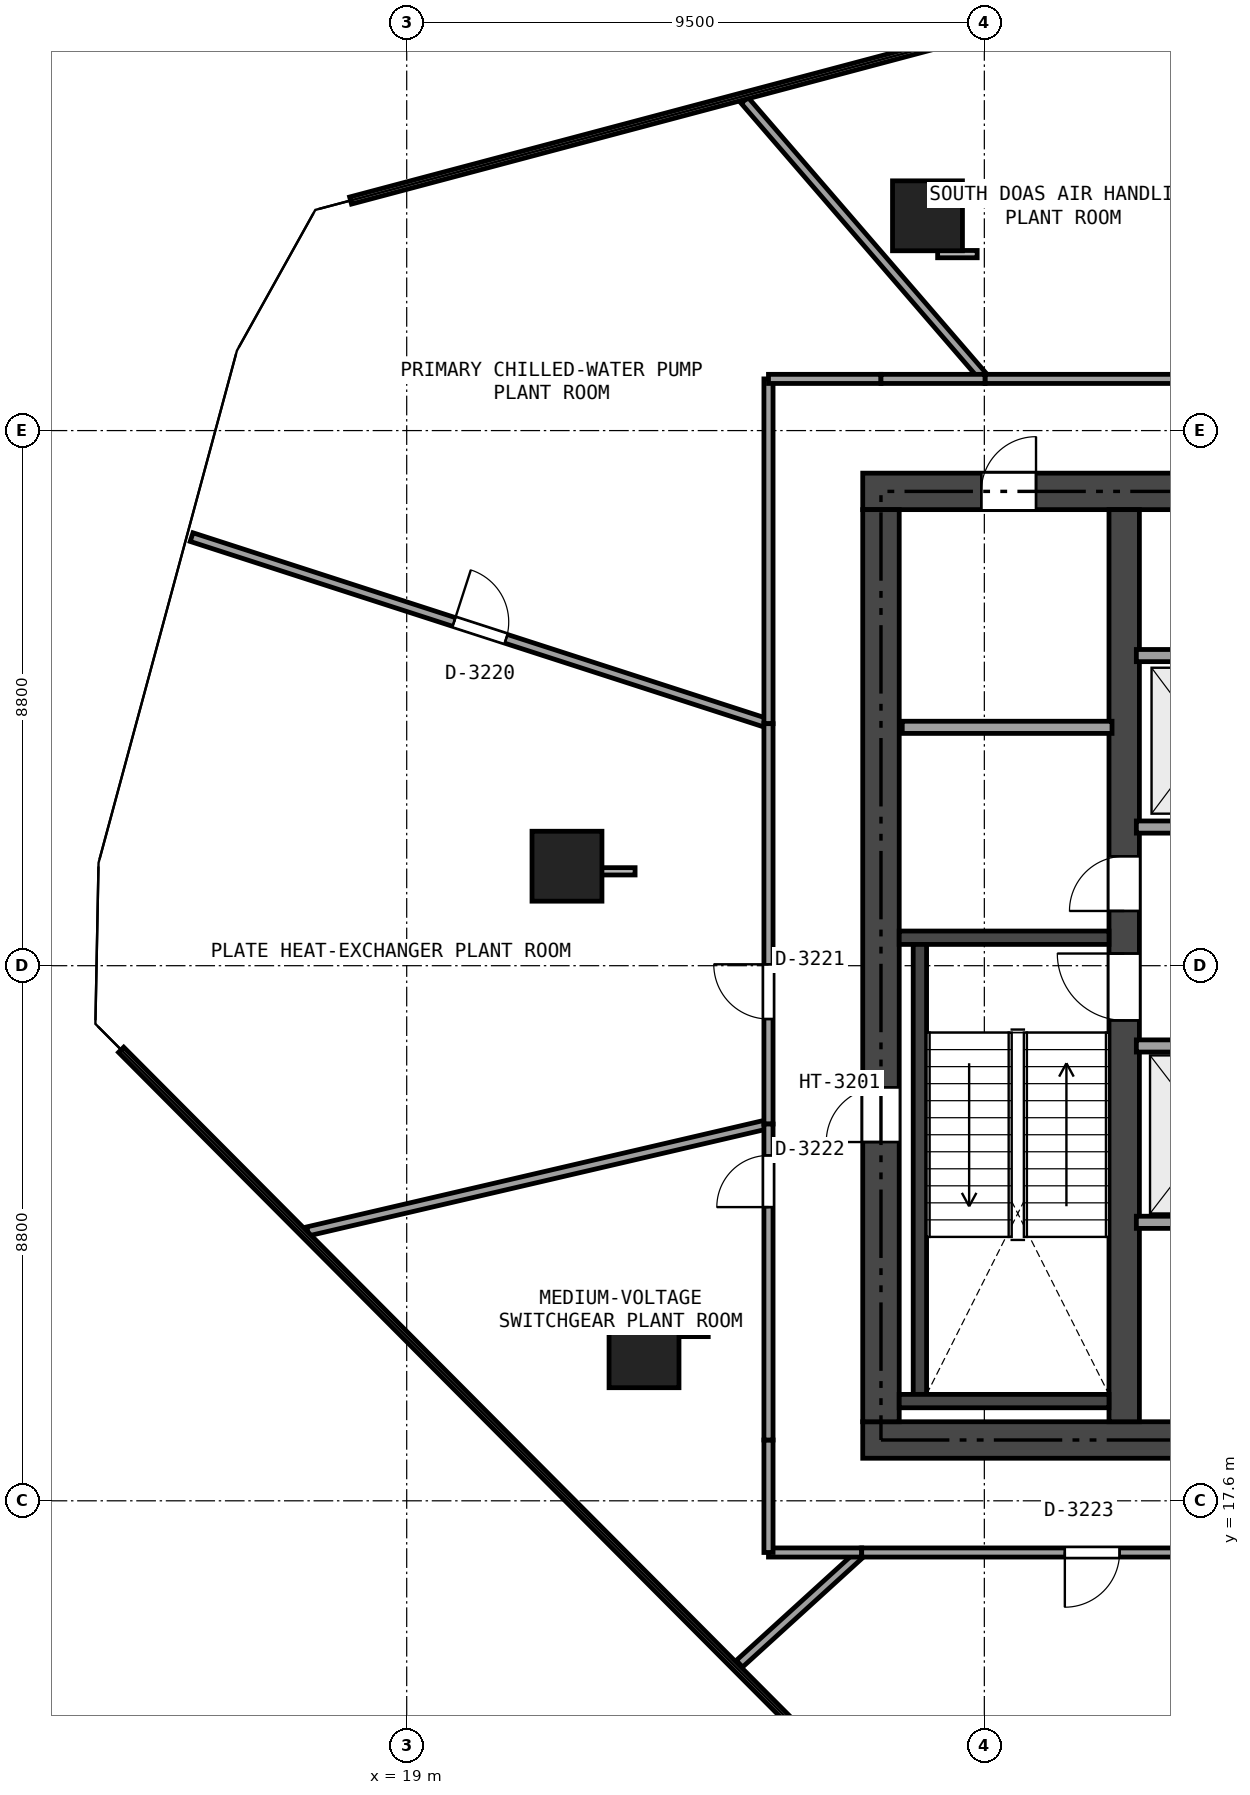
"""IFC4 building model, lengths in metres.
Left out: names, types, materials, properties, quantities, classifications, styles, units other than length and angle.
Written with IfcOpenShell. Run it as: python <this file> out.ifc"""

import sys

from ifc_helpers import new_model, si_unit, direction, frame, frame_2d, origin, origin_2d, place, context, subcontext, project, spatial, rectangle, extrude, element, fill, save


model = new_model("IFC4")
c1 = context("Model", 3, precision=1e-05, world=origin(), true_north=direction((0.0, 1.0)))
c2 = subcontext(c1, "Body", "Model", "MODEL_VIEW")
j1 = project(units=[si_unit("LENGTHUNIT", "METRE"), si_unit("PLANEANGLEUNIT", "RADIAN")], contexts=[c1])
p1 = place(None, origin())
s1 = spatial("IfcSite", under=j1, at=p1, CompositionType="ELEMENT")
p2 = place(p1, origin())
s2 = spatial("IfcBuilding", under=s1, at=p2, CompositionType="ELEMENT")
p3 = place(p2, frame((0.0, 0.0, 121.2)))
s3 = spatial("IfcBuildingStorey", under=s2, at=p3, CompositionType="ELEMENT", Elevation=121.2)
p4 = place(p3, frame((26.5, 18.6, 0.0), z_axis=(0.0, 0.0, 1.0), x_axis=(1.0, 0.0, 0.0)))
e1 = element("IfcWall", 1, at=p4, inside=s3, PredefinedType="SHEAR", context=c2, shape_type="SweptSolid", body=[
    extrude(rectangle(XDim=21.4, YDim=0.6, at=frame_2d((10.7, 0.0))), origin(), (0.0, 0.0, 1.0), 4.08),
])
p5 = place(p4, frame((12.425, 0.0, 0.0)))
e2 = element("IfcOpeningElement", 2, at=p5, cuts=e1, PredefinedType="OPENING", context=c2, shape_type="SweptSolid", body=[
    extrude(rectangle(XDim=1.15, YDim=2.15, at=frame_2d((0.575, 1.075))), frame((0.0, 0.31, 0.0), z_axis=(0.0, -1.0, 0.0), x_axis=(1.0, 0.0, 0.0)), (0.0, 0.0, 1.0), 0.62),
])
p6 = place(p4, frame((5.25, 0.0, 0.0)))
e3 = element("IfcOpeningElement", 3, at=p6, cuts=e1, PredefinedType="OPENING", context=c2, shape_type="SweptSolid", body=[
    extrude(rectangle(XDim=0.9, YDim=2.1, at=frame_2d((0.45, 1.05))), frame((0.0, 0.31, 0.0), z_axis=(0.0, -1.0, 0.0), x_axis=(1.0, 0.0, 0.0)), (0.0, 0.0, 1.0), 0.62),
])
p7 = place(p3, frame((26.5, 34.2, 0.0), z_axis=(0.0, 0.0, 1.0), x_axis=(1.0, 0.0, 0.0)))
e4 = element("IfcWall", 4, at=p7, inside=s3, PredefinedType="SHEAR", context=c2, shape_type="SweptSolid", body=[
    extrude(rectangle(XDim=21.4, YDim=0.6, at=frame_2d((10.7, 0.0))), origin(), (0.0, 0.0, 1.0), 4.08),
])
p8 = place(p7, frame((9.7, 0.0, 0.0)))
e5 = element("IfcOpeningElement", 5, at=p8, cuts=e4, PredefinedType="OPENING", context=c2, shape_type="SweptSolid", body=[
    extrude(rectangle(XDim=1.1, YDim=2.15, at=frame_2d((0.55, 1.075))), frame((0.0, 0.31, 0.0), z_axis=(0.0, -1.0, 0.0), x_axis=(1.0, 0.0, 0.0)), (0.0, 0.0, 1.0), 0.62),
])
p9 = place(p7, frame((1.95, 0.0, 0.0)))
e6 = element("IfcOpeningElement", 6, at=p9, cuts=e4, PredefinedType="OPENING", context=c2, shape_type="SweptSolid", body=[
    extrude(rectangle(XDim=0.9, YDim=2.1, at=frame_2d((0.45, 1.05))), frame((0.0, 0.31, 0.0), z_axis=(0.0, -1.0, 0.0), x_axis=(1.0, 0.0, 0.0)), (0.0, 0.0, 1.0), 0.62),
])
p10 = place(p7, frame((6.25, 0.0, 0.0)))
e7 = element("IfcOpeningElement", 7, at=p10, cuts=e4, PredefinedType="OPENING", context=c2, shape_type="SweptSolid", body=[
    extrude(rectangle(XDim=0.9, YDim=2.1, at=frame_2d((0.45, 1.05))), frame((0.0, 0.31, 0.0), z_axis=(0.0, -1.0, 0.0), x_axis=(1.0, 0.0, 0.0)), (0.0, 0.0, 1.0), 0.62),
])
p11 = place(p3, frame((26.8, 18.9, 0.0), z_axis=(0.0, 0.0, 1.0), x_axis=(0.0, 1.0, 0.0)))
e8 = element("IfcWall", 8, at=p11, inside=s3, PredefinedType="SHEAR", context=c2, shape_type="SweptSolid", body=[
    extrude(rectangle(XDim=15.0, YDim=0.6, at=frame_2d((7.5, 0.0))), origin(), (0.0, 0.0, 1.0), 4.08),
])
p12 = place(p11, frame((4.6, 0.0, 0.02)))
e9 = element("IfcOpeningElement", 9, at=p12, cuts=e8, PredefinedType="OPENING", context=c2, shape_type="SweptSolid", body=[
    extrude(rectangle(XDim=0.9, YDim=2.02, at=frame_2d((0.45, 1.01))), frame((0.0, 0.31, 0.0), z_axis=(0.0, -1.0, 0.0), x_axis=(1.0, 0.0, 0.0)), (0.0, 0.0, 1.0), 0.62),
])
p13 = place(p3, frame((30.8, 18.9, 0.0), z_axis=(0.0, 0.0, 1.0), x_axis=(0.0, 1.0, 0.0)))
e10 = element("IfcWall", 10, at=p13, inside=s3, PredefinedType="SHEAR", context=c2, shape_type="SweptSolid", body=[
    extrude(rectangle(XDim=15.0, YDim=0.5, at=frame_2d((7.5, 0.0))), origin(), (0.0, 0.0, 1.0), 4.08),
])
p14 = place(p13, frame((6.6, 0.0, 0.0)))
e11 = element("IfcOpeningElement", 11, at=p14, cuts=e10, PredefinedType="OPENING", context=c2, shape_type="SweptSolid", body=[
    extrude(rectangle(XDim=1.1, YDim=2.15, at=frame_2d((0.55, 1.075))), frame((0.0, 0.26, 0.0), z_axis=(0.0, -1.0, 0.0), x_axis=(1.0, 0.0, 0.0)), (0.0, 0.0, 1.0), 0.52),
])
p15 = place(p13, frame((8.4, 0.0, 0.0)))
e12 = element("IfcOpeningElement", 12, at=p15, cuts=e10, PredefinedType="OPENING", context=c2, shape_type="SweptSolid", body=[
    extrude(rectangle(XDim=0.9, YDim=2.1, at=frame_2d((0.45, 1.05))), frame((0.0, 0.26, 0.0), z_axis=(0.0, -1.0, 0.0), x_axis=(1.0, 0.0, 0.0)), (0.0, 0.0, 1.0), 0.52),
])
p16 = place(p3, frame((27.1, 26.86, 0.0), z_axis=(0.0, 0.0, 1.0), x_axis=(1.0, 0.0, 0.0)))
e13 = element("IfcWall", 13, at=p16, inside=s3, PredefinedType="SHEAR", context=c2, shape_type="SweptSolid", body=[
    extrude(rectangle(XDim=3.45, YDim=0.22, at=frame_2d((1.725, 0.0))), origin(), (0.0, 0.0, 1.0), 4.08),
])
p17 = place(p3, frame((27.44, 19.35, 0.0), z_axis=(0.0, 0.0, 1.0), x_axis=(0.0, 1.0, 0.0)))
e14 = element("IfcWall", 14, at=p17, inside=s3, PredefinedType="SHEAR", context=c2, shape_type="SweptSolid", body=[
    extrude(rectangle(XDim=7.4, YDim=0.22, at=frame_2d((3.7, 0.0))), origin(), (0.0, 0.0, 1.0), 4.08),
])
p18 = place(p3, frame((27.1, 19.24, 0.0), z_axis=(0.0, 0.0, 1.0), x_axis=(1.0, 0.0, 0.0)))
e15 = element("IfcWall", 15, at=p18, inside=s3, PredefinedType="SHEAR", context=c2, shape_type="SweptSolid", body=[
    extrude(rectangle(XDim=3.45, YDim=0.22, at=frame_2d((1.725, 0.0))), origin(), (0.0, 0.0, 1.0), 4.08),
])
for number, where, z_axis, x_axis in (
    (16, (27.565, 38.732, 0.0), (0.0, 0.0, 1.0), (1.0, 0.0, 0.0)),
    (17, (21.636, 28.036, 0.0), (0.0, 0.0, 1.0), (1.0, 0.0, 0.0)),
    (18, (22.903, 20.035, 0.0), (0.0, 0.0, 1.0), (1.0, 0.0, 0.0)),
):
    element("IfcColumn", number, at=place(p3, frame(where, z_axis=z_axis, x_axis=x_axis)), inside=s3, PredefinedType="COLUMN", context=c2, shape_type="SweptSolid", body=[
        extrude(rectangle(XDim=1.15, YDim=1.15, at=origin_2d()), origin(), (0.0, 0.0, 1.0), 4.08),
    ])
p19 = place(p3, frame((27.15, 30.32, 0.0), z_axis=(0.0, 0.0, 1.0), x_axis=(1.0, 0.0, 0.0)))
e19 = element("IfcWall", 19, at=p19, inside=s3, PredefinedType="SOLIDWALL", context=c2, shape_type="SweptSolid", body=[
    extrude(rectangle(XDim=3.45, YDim=0.2, at=frame_2d((1.725, 0.0))), origin(), (0.0, 0.0, 1.0), 4.08),
])
p20 = place(p3, frame((31.0, 28.68, 0.0), z_axis=(0.0, 0.0, 1.0), x_axis=(1.0, 0.0, 0.0)))
e20 = element("IfcWall", 20, at=p20, inside=s3, PredefinedType="SOLIDWALL", context=c2, shape_type="SweptSolid", body=[
    extrude(rectangle(XDim=4.42, YDim=0.2, at=frame_2d((2.21, 0.0))), origin(), (0.0, 0.0, 1.0), 4.08),
])
p21 = place(p20, frame((0.6, 0.0, 0.0)))
e21 = element("IfcOpeningElement", 21, at=p21, cuts=e20, PredefinedType="OPENING", context=c2, shape_type="SweptSolid", body=[
    extrude(rectangle(XDim=1.1, YDim=2.15, at=frame_2d((0.55, 1.075))), frame((0.0, 0.11, 0.0), z_axis=(0.0, -1.0, 0.0), x_axis=(1.0, 0.0, 0.0)), (0.0, 0.0, 1.0), 0.22),
])
p22 = place(p20, frame((2.85, 0.0, 0.0)))
e22 = element("IfcOpeningElement", 22, at=p22, cuts=e20, PredefinedType="OPENING", context=c2, shape_type="SweptSolid", body=[
    extrude(rectangle(XDim=1.1, YDim=2.15, at=frame_2d((0.55, 1.075))), frame((0.0, 0.11, 0.0), z_axis=(0.0, -1.0, 0.0), x_axis=(1.0, 0.0, 0.0)), (0.0, 0.0, 1.0), 0.22),
])
p23 = place(p3, frame((31.0, 31.5, 0.0), z_axis=(0.0, 0.0, 1.0), x_axis=(1.0, 0.0, 0.0)))
e23 = element("IfcWall", 23, at=p23, inside=s3, PredefinedType="SOLIDWALL", context=c2, shape_type="SweptSolid", body=[
    extrude(rectangle(XDim=4.42, YDim=0.2, at=frame_2d((2.21, 0.0))), origin(), (0.0, 0.0, 1.0), 4.08),
])
p24 = place(p3, frame((31.0, 25.08, 0.0), z_axis=(0.0, 0.0, 1.0), x_axis=(1.0, 0.0, 0.0)))
e24 = element("IfcWall", 24, at=p24, inside=s3, PredefinedType="SOLIDWALL", context=c2, shape_type="SweptSolid", body=[
    extrude(rectangle(XDim=4.42, YDim=0.2, at=frame_2d((2.21, 0.0))), origin(), (0.0, 0.0, 1.0), 4.08),
])
p25 = place(p24, frame((3.0, 0.0, 0.0)))
e25 = element("IfcOpeningElement", 25, at=p25, cuts=e24, PredefinedType="OPENING", context=c2, shape_type="SweptSolid", body=[
    extrude(rectangle(XDim=0.9, YDim=2.1, at=frame_2d((0.45, 1.05))), frame((0.0, 0.11, 0.0), z_axis=(0.0, -1.0, 0.0), x_axis=(1.0, 0.0, 0.0)), (0.0, 0.0, 1.0), 0.22),
])
p26 = place(p24, frame((0.62, 0.0, 0.0)))
e26 = element("IfcOpeningElement", 26, at=p26, cuts=e24, PredefinedType="OPENING", context=c2, shape_type="SweptSolid", body=[
    extrude(rectangle(XDim=1.2, YDim=2.15, at=frame_2d((0.6, 1.075))), frame((0.0, 0.11, 0.0), z_axis=(0.0, -1.0, 0.0), x_axis=(1.0, 0.0, 0.0)), (0.0, 0.0, 1.0), 0.22),
])
p27 = place(p3, frame((31.0, 22.18, 0.0), z_axis=(0.0, 0.0, 1.0), x_axis=(1.0, 0.0, 0.0)))
e27 = element("IfcWall", 27, at=p27, inside=s3, PredefinedType="SOLIDWALL", context=c2, shape_type="SweptSolid", body=[
    extrude(rectangle(XDim=2.42, YDim=0.2, at=frame_2d((1.21, 0.0))), origin(), (0.0, 0.0, 1.0), 4.08),
])
p28 = place(p3, frame((24.557, 40.631, 0.0), z_axis=(0.0, 0.0, 1.0), x_axis=(0.653405569298, -0.75700803299, 0.0)))
e28 = element("IfcWall", 28, at=p28, inside=s3, PredefinedType="PARTITIONING", context=c2, shape_type="SweptSolid", body=[
    extrude(rectangle(XDim=6.052, YDim=0.15, at=frame_2d((3.026, 0.0))), origin(), (0.0, 0.0, 1.0), 3.365),
])
p29 = place(p3, frame((28.511, 36.05, 0.0), z_axis=(0.0, 0.0, 1.0), x_axis=(1.0, 0.0, 0.0)))
e29 = element("IfcWall", 29, at=p29, inside=s3, PredefinedType="PARTITIONING", context=c2, shape_type="SweptSolid", body=[
    extrude(rectangle(XDim=6.638, YDim=0.15, at=frame_2d((3.319, 0.0))), origin(), (0.0, 0.0, 1.0), 3.065),
])
p30 = place(p29, frame((3.245, 0.0, 0.0)))
e30 = element("IfcOpeningElement", 30, at=p30, cuts=e29, PredefinedType="OPENING", context=c2, shape_type="SweptSolid", body=[
    extrude(rectangle(XDim=0.9, YDim=2.0, at=frame_2d((0.45, 1.0))), frame((0.0, 0.085, 0.0), z_axis=(0.0, -1.0, 0.0), x_axis=(1.0, 0.0, 0.0)), (0.0, 0.0, 1.0), 0.17),
])
p31 = place(p3, frame((15.462, 33.448, 0.0), z_axis=(0.0, 0.0, 1.0), x_axis=(0.951489851006, -0.307680131683, 0.0)))
e31 = element("IfcWall", 31, at=p31, inside=s3, PredefinedType="PARTITIONING", context=c2, shape_type="SweptSolid", body=[
    extrude(rectangle(XDim=9.972, YDim=0.15, at=frame_2d((4.986, 0.0))), origin(), (0.0, 0.0, 1.0), 3.365),
])
p32 = place(p31, frame((4.536, 0.0, 0.0)))
e32 = element("IfcOpeningElement", 32, at=p32, cuts=e31, PredefinedType="OPENING", context=c2, shape_type="SweptSolid", body=[
    extrude(rectangle(XDim=0.9, YDim=2.0, at=frame_2d((0.45, 1.0))), frame((0.0, 0.085, 0.0), z_axis=(0.0, -1.0, 0.0), x_axis=(1.0, 0.0, 0.0)), (0.0, 0.0, 1.0), 0.17),
])
p33 = place(p3, frame((24.95, 30.38, 0.0), z_axis=(0.0, 0.0, 1.0), x_axis=(0.0, 1.0, 0.0)))
e33 = element("IfcWall", 33, at=p33, inside=s3, PredefinedType="PARTITIONING", context=c2, shape_type="SweptSolid", body=[
    extrude(rectangle(XDim=5.67, YDim=0.15, at=frame_2d((2.835, 0.0))), origin(), (0.0, 0.0, 1.0), 3.365),
])
p34 = place(p3, frame((24.95, 36.05, 0.0), z_axis=(0.0, 0.0, 1.0), x_axis=(1.0, 0.0, 0.0)))
e34 = element("IfcWall", 34, at=p34, inside=s3, PredefinedType="PARTITIONING", context=c2, shape_type="SweptSolid", body=[
    extrude(rectangle(XDim=1.85, YDim=0.15, at=frame_2d((0.925, 0.0))), origin(), (0.0, 0.0, 1.0), 3.365),
])
p35 = place(p3, frame((26.8, 36.05, 0.0), z_axis=(0.0, 0.0, 1.0), x_axis=(1.0, 0.0, 0.0)))
e35 = element("IfcWall", 35, at=p35, inside=s3, PredefinedType="PARTITIONING", context=c2, shape_type="SweptSolid", body=[
    extrude(rectangle(XDim=1.711, YDim=0.15, at=frame_2d((0.855, 0.0))), origin(), (0.0, 0.0, 1.0), 4.08),
])
p36 = place(p3, frame((17.373, 22.031, 0.0), z_axis=(0.0, 0.0, 1.0), x_axis=(0.973927942372, 0.226857583226, 0.0)))
e36 = element("IfcWall", 36, at=p36, inside=s3, PredefinedType="PARTITIONING", context=c2, shape_type="SweptSolid", body=[
    extrude(rectangle(XDim=7.78, YDim=0.15, at=frame_2d((3.89, 0.0))), origin(), (0.0, 0.0, 1.0), 3.365),
])
p37 = place(p3, frame((24.95, 23.796, 0.0), z_axis=(0.0, 0.0, 1.0), x_axis=(0.0, 1.0, 0.0)))
e37 = element("IfcWall", 37, at=p37, inside=s3, PredefinedType="PARTITIONING", context=c2, shape_type="SweptSolid", body=[
    extrude(rectangle(XDim=6.584, YDim=0.15, at=frame_2d((3.292, 0.0))), origin(), (0.0, 0.0, 1.0), 3.065),
])
p38 = place(p37, frame((1.727, 0.0, 0.0)))
e38 = element("IfcOpeningElement", 38, at=p38, cuts=e37, PredefinedType="OPENING", context=c2, shape_type="SweptSolid", body=[
    extrude(rectangle(XDim=0.9, YDim=2.0, at=frame_2d((0.45, 1.0))), frame((0.0, 0.085, 0.0), z_axis=(0.0, -1.0, 0.0), x_axis=(1.0, 0.0, 0.0)), (0.0, 0.0, 1.0), 0.17),
])
p39 = place(p3, frame((24.472, 14.92, 0.0), z_axis=(0.0, 0.0, 1.0), x_axis=(0.739590569091, 0.673057048185, 0.0)))
e39 = element("IfcWall", 39, at=p39, inside=s3, PredefinedType="PARTITIONING", context=c2, shape_type="SweptSolid", body=[
    extrude(rectangle(XDim=2.719, YDim=0.15, at=frame_2d((1.359, 0.0))), origin(), (0.0, 0.0, 1.0), 3.365),
])
p40 = place(p3, frame((26.483, 16.75, 0.0), z_axis=(0.0, 0.0, 1.0), x_axis=(-1.0, 0.0, 0.0)))
e40 = element("IfcWall", 40, at=p40, inside=s3, PredefinedType="PARTITIONING", context=c2, shape_type="SweptSolid", body=[
    extrude(rectangle(XDim=1.533, YDim=0.15, at=frame_2d((0.767, 0.0))), origin(), (0.0, 0.0, 1.0), 3.365),
])
p41 = place(p3, frame((24.95, 16.75, 0.0), z_axis=(0.0, 0.0, 1.0), x_axis=(0.0, 1.0, 0.0)))
e41 = element("IfcWall", 41, at=p41, inside=s3, PredefinedType="PARTITIONING", context=c2, shape_type="SweptSolid", body=[
    extrude(rectangle(XDim=1.85, YDim=0.15, at=frame_2d((0.925, 0.0))), origin(), (0.0, 0.0, 1.0), 3.365),
])
p42 = place(p3, frame((24.95, 18.6, 0.0), z_axis=(0.0, 0.0, 1.0), x_axis=(0.0, 1.0, 0.0)))
e42 = element("IfcWall", 42, at=p42, inside=s3, PredefinedType="PARTITIONING", context=c2, shape_type="SweptSolid", body=[
    extrude(rectangle(XDim=5.196, YDim=0.15, at=frame_2d((2.598, 0.0))), origin(), (0.0, 0.0, 1.0), 3.065),
])
p43 = place(p42, frame((3.83, 0.0, 0.0)))
e43 = element("IfcOpeningElement", 43, at=p43, cuts=e42, PredefinedType="OPENING", context=c2, shape_type="SweptSolid", body=[
    extrude(rectangle(XDim=0.85, YDim=2.0, at=frame_2d((0.425, 1.0))), frame((0.0, 0.085, 0.0), z_axis=(0.0, -1.0, 0.0), x_axis=(1.0, 0.0, 0.0)), (0.0, 0.0, 1.0), 0.17),
])
p44 = place(p3, frame((31.153, 8.199, 0.0), z_axis=(0.0, 0.0, 1.0), x_axis=(0.322350885838, 0.94662025459, 0.0)))
e44 = element("IfcWall", 44, at=p44, inside=s3, PredefinedType="PARTITIONING", context=c2, shape_type="SweptSolid", body=[
    extrude(rectangle(XDim=9.033, YDim=0.15, at=frame_2d((4.517, 0.0))), origin(), (0.0, 0.0, 1.0), 3.065),
])
p45 = place(p3, frame((34.065, 16.75, 0.0), z_axis=(0.0, 0.0, 1.0), x_axis=(-1.0, 0.0, 0.0)))
e45 = element("IfcWall", 45, at=p45, inside=s3, PredefinedType="PARTITIONING", context=c2, shape_type="SweptSolid", body=[
    extrude(rectangle(XDim=7.582, YDim=0.15, at=frame_2d((3.791, 0.0))), origin(), (0.0, 0.0, 1.0), 3.065),
])
p46 = place(p45, frame((3.341, 0.0, 0.0)))
e46 = element("IfcOpeningElement", 46, at=p46, cuts=e45, PredefinedType="OPENING", context=c2, shape_type="SweptSolid", body=[
    extrude(rectangle(XDim=0.9, YDim=2.0, at=frame_2d((0.45, 1.0))), frame((0.0, 0.085, 0.0), z_axis=(0.0, -1.0, 0.0), x_axis=(1.0, 0.0, 0.0)), (0.0, 0.0, 1.0), 0.17),
])
p47 = place(p12, origin())
e47 = element("IfcDoor", 47, at=p47, inside=s3, OperationType="SINGLE_SWING_LEFT", PredefinedType="TRAPDOOR", context=c2, shape_type="SweptSolid", body=[
    extrude(rectangle(XDim=0.9, YDim=2.02, at=frame_2d((0.45, 1.01))), frame((0.0, 0.025, 0.0), z_axis=(0.0, -1.0, 0.0), x_axis=(1.0, 0.0, 0.0)), (0.0, 0.0, 1.0), 0.05),
])
fill(e9, e47)
p48 = place(p14, origin())
e48 = element("IfcDoor", 48, at=p48, inside=s3, OperationType="SINGLE_SWING_RIGHT", PredefinedType="DOOR", context=c2, shape_type="SweptSolid", body=[
    extrude(rectangle(XDim=1.1, YDim=2.15, at=frame_2d((0.55, 1.075))), frame((0.0, 0.025, 0.0), z_axis=(0.0, -1.0, 0.0), x_axis=(1.0, 0.0, 0.0)), (0.0, 0.0, 1.0), 0.05),
])
fill(e11, e48)
p49 = place(p15, origin())
e49 = element("IfcDoor", 49, at=p49, inside=s3, OperationType="SINGLE_SWING_LEFT", PredefinedType="DOOR", context=c2, shape_type="SweptSolid", body=[
    extrude(rectangle(XDim=0.9, YDim=2.1, at=frame_2d((0.45, 1.05))), frame((0.0, 0.025, 0.0), z_axis=(0.0, -1.0, 0.0), x_axis=(1.0, 0.0, 0.0)), (0.0, 0.0, 1.0), 0.05),
])
fill(e12, e49)
p50 = place(p9, origin())
e50 = element("IfcDoor", 50, at=p50, inside=s3, OperationType="SINGLE_SWING_RIGHT", PredefinedType="DOOR", context=c2, shape_type="SweptSolid", body=[
    extrude(rectangle(XDim=0.9, YDim=2.1, at=frame_2d((0.45, 1.05))), frame((0.0, 0.025, 0.0), z_axis=(0.0, -1.0, 0.0), x_axis=(1.0, 0.0, 0.0)), (0.0, 0.0, 1.0), 0.05),
])
fill(e6, e50)
p51 = place(p32, origin())
e51 = element("IfcDoor", 51, at=p51, inside=s3, OperationType="SINGLE_SWING_LEFT", PredefinedType="DOOR", context=c2, shape_type="SweptSolid", body=[
    extrude(rectangle(XDim=0.9, YDim=2.0, at=frame_2d((0.45, 1.0))), frame((0.0, 0.025, 0.0), z_axis=(0.0, -1.0, 0.0), x_axis=(1.0, 0.0, 0.0)), (0.0, 0.0, 1.0), 0.05),
])
fill(e32, e51)
p52 = place(p38, origin())
e52 = element("IfcDoor", 52, at=p52, inside=s3, OperationType="SINGLE_SWING_RIGHT", PredefinedType="DOOR", context=c2, shape_type="SweptSolid", body=[
    extrude(rectangle(XDim=0.9, YDim=2.0, at=frame_2d((0.45, 1.0))), frame((0.0, 0.025, 0.0), z_axis=(0.0, -1.0, 0.0), x_axis=(1.0, 0.0, 0.0)), (0.0, 0.0, 1.0), 0.05),
])
fill(e38, e52)
p53 = place(p43, origin())
e53 = element("IfcDoor", 53, at=p53, inside=s3, OperationType="SINGLE_SWING_LEFT", PredefinedType="DOOR", context=c2, shape_type="SweptSolid", body=[
    extrude(rectangle(XDim=0.85, YDim=2.0, at=frame_2d((0.425, 1.0))), frame((0.0, 0.025, 0.0), z_axis=(0.0, -1.0, 0.0), x_axis=(1.0, 0.0, 0.0)), (0.0, 0.0, 1.0), 0.05),
])
fill(e43, e53)
p54 = place(p46, origin())
e54 = element("IfcDoor", 54, at=p54, inside=s3, OperationType="SINGLE_SWING_RIGHT", PredefinedType="DOOR", context=c2, shape_type="SweptSolid", body=[
    extrude(rectangle(XDim=0.9, YDim=2.0, at=frame_2d((0.45, 1.0))), frame((0.0, 0.025, 0.0), z_axis=(0.0, -1.0, 0.0), x_axis=(1.0, 0.0, 0.0)), (0.0, 0.0, 1.0), 0.05),
])
fill(e46, e54)
save(model, sys.argv[1])
